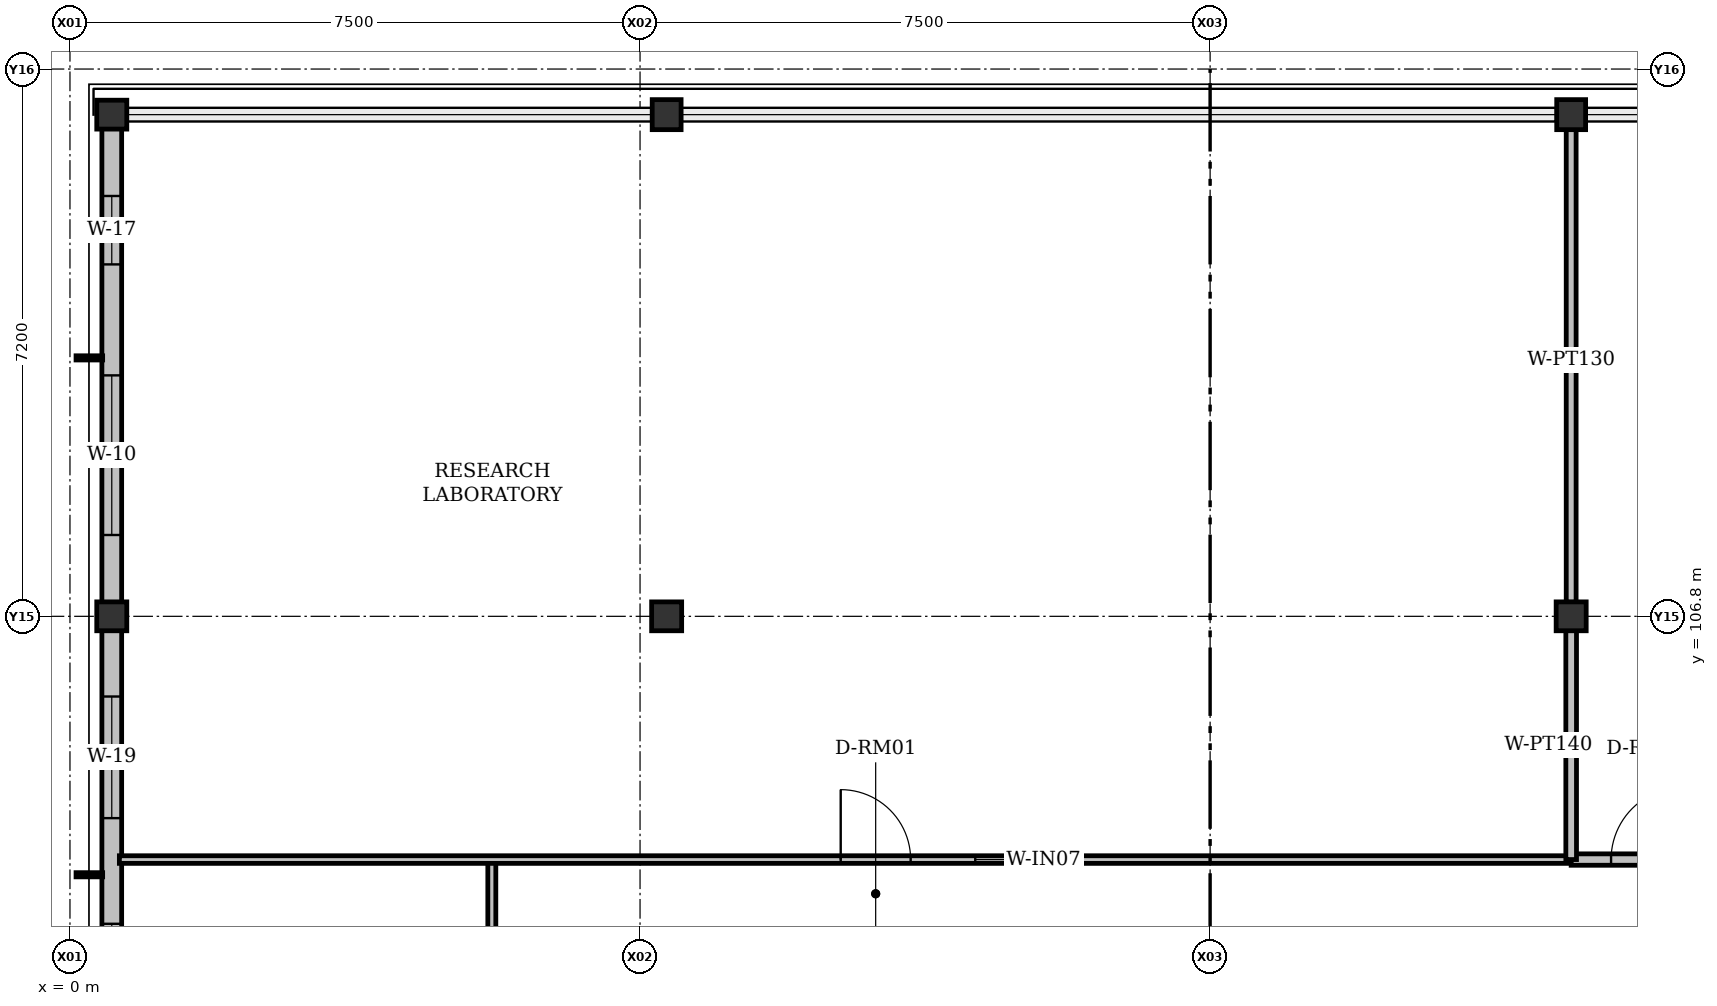
"""IFC4 building model, lengths in metres.
Left out: names, types, materials, properties, quantities, classifications, styles, units other than length and angle.
Written with IfcOpenShell. Run it as: python <this file> out.ifc"""

import sys

from ifc_helpers import new_model, si_unit, direction, frame, frame_2d, origin, origin_2d, place, context, subcontext, project, spatial, rectangle, i_section, extrude, element, fill, save


model = new_model("IFC4")
c1 = context("Model", 3, precision=1e-05, world=origin(), true_north=direction((0.0, 1.0)))
c2 = subcontext(c1, "Body", "Model", "MODEL_VIEW")
j1 = project(units=[si_unit("LENGTHUNIT", "METRE"), si_unit("PLANEANGLEUNIT", "RADIAN")], contexts=[c1])
p1 = place(None, origin())
s1 = spatial("IfcSite", under=j1, at=p1, CompositionType="ELEMENT")
p2 = place(p1, origin())
s2 = spatial("IfcBuilding", under=s1, at=p2, CompositionType="ELEMENT")
p3 = place(p2, frame((0.0, 0.0, 14.1)))
s3 = spatial("IfcBuildingStorey", under=s2, at=p3, CompositionType="ELEMENT", Elevation=14.1)
for number, where, z_axis, x_axis in (
    (1, (0.55, 106.8, 0.0), (0.0, 0.0, 1.0), (1.0, 0.0, 0.0)),
    (2, (7.85, 106.8, 0.0), (0.0, 0.0, 1.0), (1.0, 0.0, 0.0)),
    (3, (19.75, 106.8, 0.0), (0.0, 0.0, 1.0), (1.0, 0.0, 0.0)),
    (4, (0.55, 113.4, 0.0), (0.0, 0.0, 1.0), (1.0, 0.0, 0.0)),
    (5, (7.85, 113.4, 0.0), (0.0, 0.0, 1.0), (0.0, 1.0, 0.0)),
    (6, (19.75, 113.4, 0.0), (0.0, 0.0, 1.0), (0.0, 1.0, 0.0)),
):
    element("IfcColumn", number, at=place(p3, frame(where, z_axis=z_axis, x_axis=x_axis)), inside=s3, PredefinedType="COLUMN", context=c2, shape_type="SweptSolid", body=[
        extrude(i_section(OverallWidth=0.395, OverallDepth=0.38, WebThickness=0.019, FlangeThickness=0.03, FilletRadius=0.015, at=origin_2d()), origin(), (0.0, 0.0, 1.0), 4.2),
    ])
p4 = place(p3, frame((0.55, 99.6, 0.0), z_axis=(0.0, 0.0, 1.0), x_axis=(0.0, 1.0, 0.0)))
e7 = element("IfcWall", 7, at=p4, inside=s3, PredefinedType="SOLIDWALL", context=c2, shape_type="SweptSolid", body=[
    extrude(rectangle(XDim=7.2, YDim=0.26, at=frame_2d((3.6, 0.0))), origin(), (0.0, 0.0, 1.0), 3.577),
])
p5 = place(p4, frame((1.355, 0.0, 0.92)))
e8 = element("IfcOpeningElement", 8, at=p5, cuts=e7, PredefinedType="OPENING", context=c2, shape_type="SweptSolid", body=[
    extrude(rectangle(XDim=1.8, YDim=1.55, at=frame_2d((0.9, 0.775))), frame((0.0, 0.13, 0.0), z_axis=(0.0, -1.0, 0.0), x_axis=(1.0, 0.0, 0.0)), (0.0, 0.0, 1.0), 0.26),
])
p6 = place(p4, frame((4.545, 0.0, 0.92)))
e9 = element("IfcOpeningElement", 9, at=p6, cuts=e7, PredefinedType="OPENING", context=c2, shape_type="SweptSolid", body=[
    extrude(rectangle(XDim=1.6, YDim=1.35, at=frame_2d((0.8, 0.675))), frame((0.0, 0.13, 0.0), z_axis=(0.0, -1.0, 0.0), x_axis=(1.0, 0.0, 0.0)), (0.0, 0.0, 1.0), 0.26),
])
p7 = place(p3, frame((0.55, 106.8, 0.0), z_axis=(0.0, 0.0, 1.0), x_axis=(0.0, 1.0, 0.0)))
e10 = element("IfcWall", 10, at=p7, inside=s3, PredefinedType="SOLIDWALL", context=c2, shape_type="SweptSolid", body=[
    extrude(rectangle(XDim=6.6, YDim=0.26, at=frame_2d((3.3, 0.0))), origin(), (0.0, 0.0, 1.0), 3.577),
])
p8 = place(p7, frame((1.07, 0.0, 0.92)))
e11 = element("IfcOpeningElement", 11, at=p8, cuts=e10, PredefinedType="OPENING", context=c2, shape_type="SweptSolid", body=[
    extrude(rectangle(XDim=2.1, YDim=1.55, at=frame_2d((1.05, 0.775))), frame((0.0, 0.13, 0.0), z_axis=(0.0, -1.0, 0.0), x_axis=(1.0, 0.0, 0.0)), (0.0, 0.0, 1.0), 0.26),
])
p9 = place(p7, frame((4.63, 0.0, 0.92)))
e12 = element("IfcOpeningElement", 12, at=p9, cuts=e10, PredefinedType="OPENING", context=c2, shape_type="SweptSolid", body=[
    extrude(rectangle(XDim=0.9, YDim=1.3, at=frame_2d((0.45, 0.65))), frame((0.0, 0.13, 0.0), z_axis=(0.0, -1.0, 0.0), x_axis=(1.0, 0.0, 0.0)), (0.0, 0.0, 1.0), 0.26),
])
p10 = place(p3, frame((5.55, 75.8, 0.0), z_axis=(0.0, 0.0, 1.0), x_axis=(0.0, 1.0, 0.0)))
e13 = element("IfcWall", 13, at=p10, inside=s3, PredefinedType="PARTITIONING", context=c2, shape_type="SweptSolid", body=[
    extrude(rectangle(XDim=27.8, YDim=0.105, at=frame_2d((13.9, 0.0))), origin(), (0.0, 0.0, 1.0), 3.451),
])
p11 = place(p10, frame((13.06, 0.0, 0.0)))
e14 = element("IfcOpeningElement", 14, at=p11, cuts=e13, PredefinedType="OPENING", context=c2, shape_type="SweptSolid", body=[
    extrude(rectangle(XDim=1.68, YDim=2.35, at=frame_2d((0.84, 1.175))), frame((0.0, 0.052, 0.0), z_axis=(0.0, -1.0, 0.0), x_axis=(1.0, 0.0, 0.0)), (0.0, 0.0, 1.0), 0.105),
])
p12 = place(p10, frame((15.59, 0.0, 0.92)))
e15 = element("IfcOpeningElement", 15, at=p12, cuts=e13, PredefinedType="OPENING", context=c2, shape_type="SweptSolid", body=[
    extrude(rectangle(XDim=1.05, YDim=1.2, at=frame_2d((0.525, 0.6))), frame((0.0, 0.052, 0.0), z_axis=(0.0, -1.0, 0.0), x_axis=(1.0, 0.0, 0.0)), (0.0, 0.0, 1.0), 0.105),
])
p13 = place(p3, frame((0.65, 103.6, 0.0), z_axis=(0.0, 0.0, 1.0), x_axis=(1.0, 0.0, 0.0)))
e16 = element("IfcWall", 16, at=p13, inside=s3, PredefinedType="PARTITIONING", context=c2, shape_type="SweptSolid", body=[
    extrude(rectangle(XDim=19.1, YDim=0.1, at=frame_2d((9.55, 0.0))), origin(), (0.0, 0.0, 1.0), 3.527),
])
p14 = place(p13, frame((9.49, 0.0, 0.0)))
e17 = element("IfcOpeningElement", 17, at=p14, cuts=e16, PredefinedType="OPENING", context=c2, shape_type="SweptSolid", body=[
    extrude(rectangle(XDim=0.92, YDim=2.1, at=frame_2d((0.46, 1.05))), frame((0.0, 0.05, 0.0), z_axis=(0.0, -1.0, 0.0), x_axis=(1.0, 0.0, 0.0)), (0.0, 0.0, 1.0), 0.1),
])
p15 = place(p13, frame((11.26, 0.0, 0.92)))
e18 = element("IfcOpeningElement", 18, at=p15, cuts=e16, PredefinedType="OPENING", context=c2, shape_type="SweptSolid", body=[
    extrude(rectangle(XDim=1.2, YDim=1.2, at=frame_2d((0.6, 0.6))), frame((0.0, 0.05, 0.0), z_axis=(0.0, -1.0, 0.0), x_axis=(1.0, 0.0, 0.0)), (0.0, 0.0, 1.0), 0.1),
])
p16 = place(p3, frame((19.75, 103.6, 0.0), z_axis=(0.0, 0.0, 1.0), x_axis=(1.0, 0.0, 0.0)))
e19 = element("IfcWall", 19, at=p16, inside=s3, PredefinedType="PARTITIONING", context=c2, shape_type="SweptSolid", body=[
    extrude(rectangle(XDim=9.165, YDim=0.15, at=frame_2d((4.583, 0.0))), origin(), (0.0, 0.0, 1.0), 3.527),
])
p17 = place(p16, frame((0.525, 0.0, 0.0)))
e20 = element("IfcOpeningElement", 20, at=p17, cuts=e19, PredefinedType="OPENING", context=c2, shape_type="SweptSolid", body=[
    extrude(rectangle(XDim=0.95, YDim=2.1, at=frame_2d((0.475, 1.05))), frame((0.0, 0.075, 0.0), z_axis=(0.0, -1.0, 0.0), x_axis=(1.0, 0.0, 0.0)), (0.0, 0.0, 1.0), 0.15),
])
p18 = place(p16, frame((2.325, 0.0, 0.92)))
e21 = element("IfcOpeningElement", 21, at=p18, cuts=e19, PredefinedType="OPENING", context=c2, shape_type="SweptSolid", body=[
    extrude(rectangle(XDim=1.4, YDim=1.2, at=frame_2d((0.7, 0.6))), frame((0.0, 0.075, 0.0), z_axis=(0.0, -1.0, 0.0), x_axis=(1.0, 0.0, 0.0)), (0.0, 0.0, 1.0), 0.15),
])
p19 = place(p3, frame((19.75, 106.615, 0.0), z_axis=(0.0, 0.0, 1.0), x_axis=(0.0, -1.0, 0.0)))
e22 = element("IfcWall", 22, at=p19, inside=s3, PredefinedType="PARTITIONING", context=c2, shape_type="SweptSolid", body=[
    extrude(rectangle(XDim=3.015, YDim=0.14, at=frame_2d((1.507, 0.0))), origin(), (0.0, 0.0, 1.0), 3.527),
])
p20 = place(p3, frame((19.75, 113.35, 0.0), z_axis=(0.0, 0.0, 1.0), x_axis=(0.0, -1.0, 0.0)))
e23 = element("IfcWall", 23, at=p20, inside=s3, PredefinedType="PARTITIONING", context=c2, shape_type="SweptSolid", body=[
    extrude(rectangle(XDim=6.365, YDim=0.13, at=frame_2d((3.183, 0.0))), origin(), (0.0, 0.0, 1.0), 3.527),
])
p21 = place(p5, origin())
e24 = element("IfcWindow", 24, at=p21, inside=s3, PartitioningType="DOUBLE_PANEL_VERTICAL", PredefinedType="WINDOW", context=c2, shape_type="SweptSolid", body=[
    extrude(rectangle(XDim=1.8, YDim=1.55, at=frame_2d((0.9, 0.775))), frame((0.0, 0.03, 0.0), z_axis=(0.0, -1.0, 0.0), x_axis=(1.0, 0.0, 0.0)), (0.0, 0.0, 1.0), 0.06),
])
fill(e8, e24)
p22 = place(p6, origin())
e25 = element("IfcWindow", 25, at=p22, inside=s3, PartitioningType="DOUBLE_PANEL_VERTICAL", PredefinedType="WINDOW", context=c2, shape_type="SweptSolid", body=[
    extrude(rectangle(XDim=1.6, YDim=1.35, at=frame_2d((0.8, 0.675))), frame((0.0, 0.03, 0.0), z_axis=(0.0, -1.0, 0.0), x_axis=(1.0, 0.0, 0.0)), (0.0, 0.0, 1.0), 0.06),
])
fill(e9, e25)
p23 = place(p8, origin())
e26 = element("IfcWindow", 26, at=p23, inside=s3, PartitioningType="DOUBLE_PANEL_VERTICAL", PredefinedType="WINDOW", context=c2, shape_type="SweptSolid", body=[
    extrude(rectangle(XDim=2.1, YDim=1.55, at=frame_2d((1.05, 0.775))), frame((0.0, 0.03, 0.0), z_axis=(0.0, -1.0, 0.0), x_axis=(1.0, 0.0, 0.0)), (0.0, 0.0, 1.0), 0.06),
])
fill(e11, e26)
p24 = place(p9, origin())
e27 = element("IfcWindow", 27, at=p24, inside=s3, PartitioningType="SINGLE_PANEL", PredefinedType="WINDOW", context=c2, shape_type="SweptSolid", body=[
    extrude(rectangle(XDim=0.9, YDim=1.3, at=frame_2d((0.45, 0.65))), frame((0.0, 0.03, 0.0), z_axis=(0.0, -1.0, 0.0), x_axis=(1.0, 0.0, 0.0)), (0.0, 0.0, 1.0), 0.06),
])
fill(e12, e27)
p25 = place(p14, origin())
e28 = element("IfcDoor", 28, at=p25, inside=s3, OperationType="SINGLE_SWING_LEFT", PredefinedType="DOOR", context=c2, shape_type="SweptSolid", body=[
    extrude(rectangle(XDim=0.92, YDim=2.1, at=frame_2d((0.46, 1.05))), frame((0.0, 0.025, 0.0), z_axis=(0.0, -1.0, 0.0), x_axis=(1.0, 0.0, 0.0)), (0.0, 0.0, 1.0), 0.05),
])
fill(e17, e28)
p26 = place(p15, origin())
e29 = element("IfcWindow", 29, at=p26, inside=s3, PartitioningType="SINGLE_PANEL", PredefinedType="WINDOW", context=c2, shape_type="SweptSolid", body=[
    extrude(rectangle(XDim=1.2, YDim=1.2, at=frame_2d((0.6, 0.6))), frame((0.0, 0.03, 0.0), z_axis=(0.0, -1.0, 0.0), x_axis=(1.0, 0.0, 0.0)), (0.0, 0.0, 1.0), 0.06),
])
fill(e18, e29)
p27 = place(p17, origin())
e30 = element("IfcDoor", 30, at=p27, inside=s3, OperationType="SINGLE_SWING_RIGHT", PredefinedType="DOOR", context=c2, shape_type="SweptSolid", body=[
    extrude(rectangle(XDim=0.95, YDim=2.1, at=frame_2d((0.475, 1.05))), frame((0.0, 0.025, 0.0), z_axis=(0.0, -1.0, 0.0), x_axis=(1.0, 0.0, 0.0)), (0.0, 0.0, 1.0), 0.05),
])
fill(e20, e30)
save(model, sys.argv[1])
